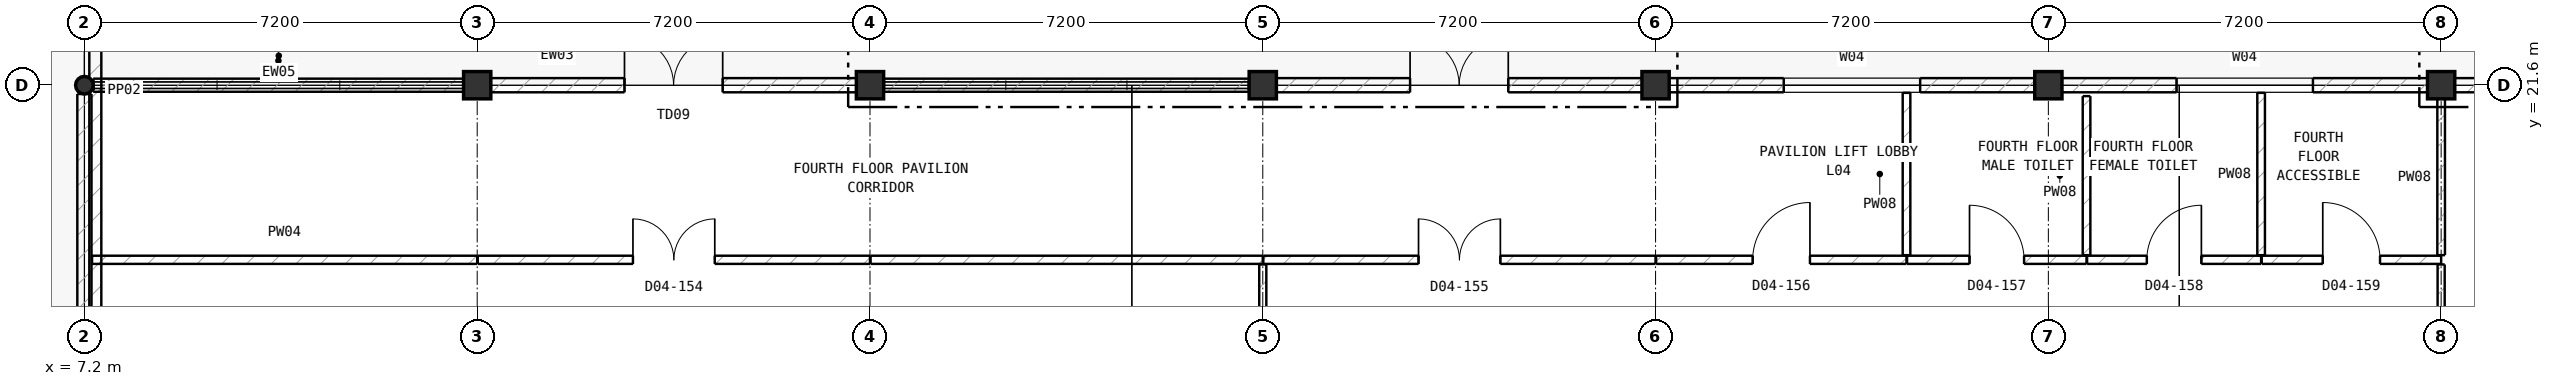
"""IFC4 building model, lengths in metres.
Left out: names, types, materials, properties, quantities, classifications, styles, units other than length and angle.
Written with IfcOpenShell. Run it as: python <this file> out.ifc"""

import sys

from ifc_helpers import new_model, si_unit, direction, frame, frame_2d, origin, origin_2d, place, context, subcontext, project, spatial, rectangle, hollow_circle, extrude, element, fill, save


model = new_model("IFC4")
c1 = context("Model", 3, precision=1e-05, world=origin(), true_north=direction((0.0, 1.0)))
c2 = subcontext(c1, "Body", "Model", "MODEL_VIEW")
j1 = project(units=[si_unit("LENGTHUNIT", "METRE"), si_unit("PLANEANGLEUNIT", "RADIAN")], contexts=[c1])
p1 = place(None, origin())
s1 = spatial("IfcSite", under=j1, at=p1, CompositionType="ELEMENT")
p2 = place(p1, origin())
s2 = spatial("IfcBuilding", under=s1, at=p2, CompositionType="ELEMENT")
p3 = place(p2, frame((0.0, 0.0, 20.4)))
s3 = spatial("IfcBuildingStorey", under=s2, at=p3, CompositionType="ELEMENT", Elevation=20.4)
p4 = place(p3, frame((7.2, 21.6, 0.0), z_axis=(0.0, 0.0, 1.0), x_axis=(1.0, 0.0, 0.0)))
e1 = element("IfcColumn", 1, at=p4, inside=s3, PredefinedType="COLUMN", context=c2, shape_type="SweptSolid", body=[
    extrude(hollow_circle(Radius=0.162, WallThickness=0.012, at=origin_2d()), origin(), (0.0, 0.0, 1.0), 4.17),
])
for number, where, z_axis, x_axis in (
    (2, (14.4, 21.6, 0.0), (0.0, 0.0, 1.0), (1.0, 0.0, 0.0)),
    (3, (21.6, 21.6, 0.0), (0.0, 0.0, 1.0), (1.0, 0.0, 0.0)),
    (4, (28.8, 21.6, 0.0), (0.0, 0.0, 1.0), (1.0, 0.0, 0.0)),
    (5, (36.0, 21.6, 0.0), (0.0, 0.0, 1.0), (1.0, 0.0, 0.0)),
    (6, (43.2, 21.6, 0.0), (0.0, 0.0, 1.0), (1.0, 0.0, 0.0)),
    (7, (50.4, 21.6, 0.0), (0.0, 0.0, 1.0), (1.0, 0.0, 0.0)),
):
    element("IfcColumn", number, at=place(p3, frame(where, z_axis=z_axis, x_axis=x_axis)), inside=s3, PredefinedType="COLUMN", context=c2, shape_type="SweptSolid", body=[
        extrude(rectangle(XDim=0.5, YDim=0.5, at=origin_2d()), origin(), (0.0, 0.0, 1.0), 4.4),
    ])
p5 = place(p3, frame((7.36, 21.6, 0.0), z_axis=(0.0, 0.0, 1.0), x_axis=(1.0, 0.0, 0.0)))
e8 = element("IfcWall", 8, at=p5, inside=s3, PredefinedType="SOLIDWALL", context=c2, shape_type="SweptSolid", body=[
    extrude(rectangle(XDim=6.805, YDim=0.24, at=frame_2d((3.402, 0.0))), origin(), (0.0, 0.0, 1.0), 0.3),
])
p6 = place(p3, frame((14.635, 21.6, 0.0), z_axis=(0.0, 0.0, 1.0), x_axis=(1.0, 0.0, 0.0)))
e9 = element("IfcWall", 9, at=p6, inside=s3, PredefinedType="SOLIDWALL", context=c2, shape_type="SweptSolid", body=[
    extrude(rectangle(XDim=6.73, YDim=0.26, at=frame_2d((3.365, 0.0))), origin(), (0.0, 0.0, 1.0), 3.655),
])
p7 = place(p6, frame((2.465, 0.0, 0.0)))
e10 = element("IfcOpeningElement", 10, at=p7, cuts=e9, PredefinedType="OPENING", context=c2, shape_type="SweptSolid", body=[
    extrude(rectangle(XDim=1.8, YDim=2.3, at=frame_2d((0.9, 1.15))), frame((0.0, 0.14, 0.0), z_axis=(0.0, -1.0, 0.0), x_axis=(1.0, 0.0, 0.0)), (0.0, 0.0, 1.0), 0.28),
])
p8 = place(p3, frame((21.835, 21.6, 0.0), z_axis=(0.0, 0.0, 1.0), x_axis=(1.0, 0.0, 0.0)))
e11 = element("IfcWall", 11, at=p8, inside=s3, PredefinedType="SOLIDWALL", context=c2, shape_type="SweptSolid", body=[
    extrude(rectangle(XDim=6.73, YDim=0.24, at=frame_2d((3.365, 0.0))), origin(), (0.0, 0.0, 1.0), 0.3),
])
p9 = place(p3, frame((29.035, 21.6, 0.0), z_axis=(0.0, 0.0, 1.0), x_axis=(1.0, 0.0, 0.0)))
e12 = element("IfcWall", 12, at=p9, inside=s3, PredefinedType="SOLIDWALL", context=c2, shape_type="SweptSolid", body=[
    extrude(rectangle(XDim=6.73, YDim=0.26, at=frame_2d((3.365, 0.0))), origin(), (0.0, 0.0, 1.0), 3.655),
])
p10 = place(p9, frame((2.465, 0.0, 0.0)))
e13 = element("IfcOpeningElement", 13, at=p10, cuts=e12, PredefinedType="OPENING", context=c2, shape_type="SweptSolid", body=[
    extrude(rectangle(XDim=1.8, YDim=2.3, at=frame_2d((0.9, 1.15))), frame((0.0, 0.14, 0.0), z_axis=(0.0, -1.0, 0.0), x_axis=(1.0, 0.0, 0.0)), (0.0, 0.0, 1.0), 0.28),
])
p11 = place(p3, frame((36.235, 21.6, 0.0), z_axis=(0.0, 0.0, 1.0), x_axis=(1.0, 0.0, 0.0)))
e14 = element("IfcWall", 14, at=p11, inside=s3, PredefinedType="SOLIDWALL", context=c2, shape_type="SweptSolid", body=[
    extrude(rectangle(XDim=6.73, YDim=0.26, at=frame_2d((3.365, 0.0))), origin(), (0.0, 0.0, 1.0), 3.655),
])
p12 = place(p11, frame((2.115, 0.0, 0.85)))
e15 = element("IfcOpeningElement", 15, at=p12, cuts=e14, PredefinedType="OPENING", context=c2, shape_type="SweptSolid", body=[
    extrude(rectangle(XDim=2.5, YDim=2.2, at=frame_2d((1.25, 1.1))), frame((0.0, 0.14, 0.0), z_axis=(0.0, -1.0, 0.0), x_axis=(1.0, 0.0, 0.0)), (0.0, 0.0, 1.0), 0.28),
])
p13 = place(p3, frame((43.435, 21.6, 0.0), z_axis=(0.0, 0.0, 1.0), x_axis=(1.0, 0.0, 0.0)))
e16 = element("IfcWall", 16, at=p13, inside=s3, PredefinedType="SOLIDWALL", context=c2, shape_type="SweptSolid", body=[
    extrude(rectangle(XDim=6.73, YDim=0.26, at=frame_2d((3.365, 0.0))), origin(), (0.0, 0.0, 1.0), 3.655),
])
p14 = place(p13, frame((2.115, 0.0, 0.85)))
e17 = element("IfcOpeningElement", 17, at=p14, cuts=e16, PredefinedType="OPENING", context=c2, shape_type="SweptSolid", body=[
    extrude(rectangle(XDim=2.5, YDim=2.2, at=frame_2d((1.25, 1.1))), frame((0.0, 0.14, 0.0), z_axis=(0.0, -1.0, 0.0), x_axis=(1.0, 0.0, 0.0)), (0.0, 0.0, 1.0), 0.28),
])
p15 = place(p3, frame((50.635, 21.6, 0.0), z_axis=(0.0, 0.0, 1.0), x_axis=(1.0, 0.0, 0.0)))
e18 = element("IfcWall", 18, at=p15, inside=s3, PredefinedType="SOLIDWALL", context=c2, shape_type="SweptSolid", body=[
    extrude(rectangle(XDim=6.73, YDim=0.26, at=frame_2d((3.365, 0.0))), origin(), (0.0, 0.0, 1.0), 3.655),
])
p16 = place(p15, frame((2.465, 0.0, 0.0)))
e19 = element("IfcOpeningElement", 19, at=p16, cuts=e18, PredefinedType="OPENING", context=c2, shape_type="SweptSolid", body=[
    extrude(rectangle(XDim=1.8, YDim=2.3, at=frame_2d((0.9, 1.15))), frame((0.0, 0.14, 0.0), z_axis=(0.0, -1.0, 0.0), x_axis=(1.0, 0.0, 0.0)), (0.0, 0.0, 1.0), 0.28),
])
p17 = place(p3, frame((7.2, 14.561, 0.0), z_axis=(0.0, 0.0, 1.0), x_axis=(0.0, 1.0, 0.0)))
e20 = element("IfcWall", 20, at=p17, inside=s3, PredefinedType="SOLIDWALL", context=c2, shape_type="SweptSolid", body=[
    extrude(rectangle(XDim=6.879, YDim=0.26, at=frame_2d((3.439, 0.0))), origin(), (0.0, 0.0, 1.0), 3.705),
])
p18 = place(p17, frame((1.1, 0.0, 0.0)))
e21 = element("IfcOpeningElement", 21, at=p18, cuts=e20, PredefinedType="OPENING", context=c2, shape_type="SweptSolid", body=[
    extrude(rectangle(XDim=1.6, YDim=2.3, at=frame_2d((0.8, 1.15))), frame((0.0, 0.14, 0.0), z_axis=(0.0, -1.0, 0.0), x_axis=(1.0, 0.0, 0.0)), (0.0, 0.0, 1.0), 0.28),
])
p19 = place(p3, frame((7.4, 28.6, 4.4), z_axis=(0.0, 0.0, 1.0), x_axis=(0.0, -1.0, 0.0)))
e22 = element("IfcWall", 22, at=p19, inside=s3, PredefinedType="PARAPET", context=c2, shape_type="SweptSolid", body=[
    extrude(rectangle(XDim=14.2, YDim=0.22, at=frame_2d((7.1, 0.0))), origin(), (0.0, 0.0, 1.0), 1.15),
])
p20 = place(p3, frame((7.34, 18.4, 0.0), z_axis=(0.0, 0.0, 1.0), x_axis=(1.0, 0.0, 0.0)))
e23 = element("IfcWall", 23, at=p20, inside=s3, PredefinedType="PARTITIONING", context=c2, shape_type="SweptSolid", body=[
    extrude(rectangle(XDim=7.06, YDim=0.15, at=frame_2d((3.53, 0.0))), origin(), (0.0, 0.0, 1.0), 4.12),
])
p21 = place(p3, frame((14.41, 18.4, 0.0), z_axis=(0.0, 0.0, 1.0), x_axis=(1.0, 0.0, 0.0)))
e24 = element("IfcWall", 24, at=p21, inside=s3, PredefinedType="PARTITIONING", context=c2, shape_type="SweptSolid", body=[
    extrude(rectangle(XDim=7.19, YDim=0.15, at=frame_2d((3.595, 0.0))), origin(), (0.0, 0.0, 1.0), 4.12),
])
p22 = place(p21, frame((2.845, 0.0, 0.0)))
e25 = element("IfcOpeningElement", 25, at=p22, cuts=e24, PredefinedType="OPENING", context=c2, shape_type="SweptSolid", body=[
    extrude(rectangle(XDim=1.5, YDim=2.2, at=frame_2d((0.75, 1.1))), frame((0.0, 0.085, 0.0), z_axis=(0.0, -1.0, 0.0), x_axis=(1.0, 0.0, 0.0)), (0.0, 0.0, 1.0), 0.17),
])
p23 = place(p3, frame((21.61, 18.4, 0.0), z_axis=(0.0, 0.0, 1.0), x_axis=(1.0, 0.0, 0.0)))
e26 = element("IfcWall", 26, at=p23, inside=s3, PredefinedType="PARTITIONING", context=c2, shape_type="SweptSolid", body=[
    extrude(rectangle(XDim=7.19, YDim=0.15, at=frame_2d((3.595, 0.0))), origin(), (0.0, 0.0, 1.0), 4.12),
])
p24 = place(p3, frame((28.81, 18.4, 0.0), z_axis=(0.0, 0.0, 1.0), x_axis=(1.0, 0.0, 0.0)))
e27 = element("IfcWall", 27, at=p24, inside=s3, PredefinedType="PARTITIONING", context=c2, shape_type="SweptSolid", body=[
    extrude(rectangle(XDim=7.19, YDim=0.15, at=frame_2d((3.595, 0.0))), origin(), (0.0, 0.0, 1.0), 4.12),
])
p25 = place(p24, frame((2.845, 0.0, 0.0)))
e28 = element("IfcOpeningElement", 28, at=p25, cuts=e27, PredefinedType="OPENING", context=c2, shape_type="SweptSolid", body=[
    extrude(rectangle(XDim=1.5, YDim=2.2, at=frame_2d((0.75, 1.1))), frame((0.0, 0.085, 0.0), z_axis=(0.0, -1.0, 0.0), x_axis=(1.0, 0.0, 0.0)), (0.0, 0.0, 1.0), 0.17),
])
p26 = place(p3, frame((36.01, 18.4, 0.0), z_axis=(0.0, 0.0, 1.0), x_axis=(1.0, 0.0, 0.0)))
e29 = element("IfcWall", 29, at=p26, inside=s3, PredefinedType="PARTITIONING", context=c2, shape_type="SweptSolid", body=[
    extrude(rectangle(XDim=4.59, YDim=0.15, at=frame_2d((2.295, 0.0))), origin(), (0.0, 0.0, 1.0), 4.12),
])
p27 = place(p26, frame((1.77, 0.0, 0.0)))
e30 = element("IfcOpeningElement", 30, at=p27, cuts=e29, PredefinedType="OPENING", context=c2, shape_type="SweptSolid", body=[
    extrude(rectangle(XDim=1.05, YDim=2.15, at=frame_2d((0.525, 1.075))), frame((0.0, 0.085, 0.0), z_axis=(0.0, -1.0, 0.0), x_axis=(1.0, 0.0, 0.0)), (0.0, 0.0, 1.0), 0.17),
])
p28 = place(p3, frame((40.61, 18.4, 0.0), z_axis=(0.0, 0.0, 1.0), x_axis=(1.0, 0.0, 0.0)))
e31 = element("IfcWall", 31, at=p28, inside=s3, PredefinedType="PARTITIONING", context=c2, shape_type="SweptSolid", body=[
    extrude(rectangle(XDim=3.29, YDim=0.15, at=frame_2d((1.645, 0.0))), origin(), (0.0, 0.0, 1.0), 4.12),
])
p29 = place(p28, frame((1.145, 0.0, 0.0)))
e32 = element("IfcOpeningElement", 32, at=p29, cuts=e31, PredefinedType="OPENING", context=c2, shape_type="SweptSolid", body=[
    extrude(rectangle(XDim=1.0, YDim=2.15, at=frame_2d((0.5, 1.075))), frame((0.0, 0.085, 0.0), z_axis=(0.0, -1.0, 0.0), x_axis=(1.0, 0.0, 0.0)), (0.0, 0.0, 1.0), 0.17),
])
p30 = place(p3, frame((43.91, 18.4, 0.0), z_axis=(0.0, 0.0, 1.0), x_axis=(1.0, 0.0, 0.0)))
e33 = element("IfcWall", 33, at=p30, inside=s3, PredefinedType="PARTITIONING", context=c2, shape_type="SweptSolid", body=[
    extrude(rectangle(XDim=3.19, YDim=0.15, at=frame_2d((1.595, 0.0))), origin(), (0.0, 0.0, 1.0), 4.12),
])
p31 = place(p30, frame((1.095, 0.0, 0.0)))
e34 = element("IfcOpeningElement", 34, at=p31, cuts=e33, PredefinedType="OPENING", context=c2, shape_type="SweptSolid", body=[
    extrude(rectangle(XDim=1.0, YDim=2.15, at=frame_2d((0.5, 1.075))), frame((0.0, 0.085, 0.0), z_axis=(0.0, -1.0, 0.0), x_axis=(1.0, 0.0, 0.0)), (0.0, 0.0, 1.0), 0.17),
])
p32 = place(p3, frame((47.11, 18.4, 0.0), z_axis=(0.0, 0.0, 1.0), x_axis=(1.0, 0.0, 0.0)))
e35 = element("IfcWall", 35, at=p32, inside=s3, PredefinedType="PARTITIONING", context=c2, shape_type="SweptSolid", body=[
    extrude(rectangle(XDim=3.29, YDim=0.15, at=frame_2d((1.645, 0.0))), origin(), (0.0, 0.0, 1.0), 4.12),
])
p33 = place(p32, frame((1.12, 0.0, 0.0)))
e36 = element("IfcOpeningElement", 36, at=p33, cuts=e35, PredefinedType="OPENING", context=c2, shape_type="SweptSolid", body=[
    extrude(rectangle(XDim=1.05, YDim=2.15, at=frame_2d((0.525, 1.075))), frame((0.0, 0.085, 0.0), z_axis=(0.0, -1.0, 0.0), x_axis=(1.0, 0.0, 0.0)), (0.0, 0.0, 1.0), 0.17),
])
p34 = place(p3, frame((40.6, 18.485, 0.0), z_axis=(0.0, 0.0, 1.0), x_axis=(0.0, 1.0, 0.0)))
e37 = element("IfcWall", 37, at=p34, inside=s3, PredefinedType="PARTITIONING", context=c2, shape_type="SweptSolid", body=[
    extrude(rectangle(XDim=2.975, YDim=0.14, at=frame_2d((1.487, 0.0))), origin(), (0.0, 0.0, 1.0), 4.12),
])
p35 = place(p3, frame((43.9, 18.485, 0.0), z_axis=(0.0, 0.0, 1.0), x_axis=(0.0, 1.0, 0.0)))
e38 = element("IfcWall", 38, at=p35, inside=s3, PredefinedType="PARTITIONING", context=c2, shape_type="SweptSolid", body=[
    extrude(rectangle(XDim=2.915, YDim=0.14, at=frame_2d((1.458, 0.0))), origin(), (0.0, 0.0, 1.0), 4.12),
])
p36 = place(p3, frame((47.1, 18.485, 0.0), z_axis=(0.0, 0.0, 1.0), x_axis=(0.0, 1.0, 0.0)))
e39 = element("IfcWall", 39, at=p36, inside=s3, PredefinedType="PARTITIONING", context=c2, shape_type="SweptSolid", body=[
    extrude(rectangle(XDim=2.975, YDim=0.14, at=frame_2d((1.487, 0.0))), origin(), (0.0, 0.0, 1.0), 4.12),
])
p37 = place(p3, frame((50.4, 18.485, 0.0), z_axis=(0.0, 0.0, 1.0), x_axis=(0.0, 1.0, 0.0)))
e40 = element("IfcWall", 40, at=p37, inside=s3, PredefinedType="PARTITIONING", context=c2, shape_type="SweptSolid", body=[
    extrude(rectangle(XDim=2.865, YDim=0.14, at=frame_2d((1.433, 0.0))), origin(), (0.0, 0.0, 1.0), 3.65),
])
p38 = place(p3, frame((28.8, 14.65, 0.0), z_axis=(0.0, 0.0, 1.0), x_axis=(0.0, 1.0, 0.0)))
e41 = element("IfcWall", 41, at=p38, inside=s3, PredefinedType="PARTITIONING", context=c2, shape_type="SweptSolid", body=[
    extrude(rectangle(XDim=3.665, YDim=0.13, at=frame_2d((1.833, 0.0))), origin(), (0.0, 0.0, 1.0), 3.65),
])
p39 = place(p3, frame((50.4, 14.65, 0.0), z_axis=(0.0, 0.0, 1.0), x_axis=(0.0, 1.0, 0.0)))
e42 = element("IfcWall", 42, at=p39, inside=s3, PredefinedType="PARTITIONING", context=c2, shape_type="SweptSolid", body=[
    extrude(rectangle(XDim=3.665, YDim=0.13, at=frame_2d((1.833, 0.0))), origin(), (0.0, 0.0, 1.0), 3.65),
])
p40 = place(p39, frame((1.333, 0.0, 0.0)))
e43 = element("IfcOpeningElement", 43, at=p40, cuts=e42, PredefinedType="OPENING", context=c2, shape_type="SweptSolid", body=[
    extrude(rectangle(XDim=1.0, YDim=2.1, at=frame_2d((0.5, 1.05))), frame((0.0, 0.075, 0.0), z_axis=(0.0, -1.0, 0.0), x_axis=(1.0, 0.0, 0.0)), (0.0, 0.0, 1.0), 0.15),
])
p41 = place(p7, origin())
e44 = element("IfcDoor", 44, at=p41, inside=s3, OperationType="DOUBLE_DOOR_SINGLE_SWING", PredefinedType="DOOR", context=c2, shape_type="SweptSolid", body=[
    extrude(rectangle(XDim=1.8, YDim=2.3, at=frame_2d((0.9, 1.15))), frame((0.0, 0.025, 0.0), z_axis=(0.0, -1.0, 0.0), x_axis=(1.0, 0.0, 0.0)), (0.0, 0.0, 1.0), 0.05),
])
fill(e10, e44)
p42 = place(p10, origin())
e45 = element("IfcDoor", 45, at=p42, inside=s3, OperationType="DOUBLE_DOOR_SINGLE_SWING", PredefinedType="DOOR", context=c2, shape_type="SweptSolid", body=[
    extrude(rectangle(XDim=1.8, YDim=2.3, at=frame_2d((0.9, 1.15))), frame((0.0, 0.025, 0.0), z_axis=(0.0, -1.0, 0.0), x_axis=(1.0, 0.0, 0.0)), (0.0, 0.0, 1.0), 0.05),
])
fill(e13, e45)
p43 = place(p12, origin())
e46 = element("IfcWindow", 46, at=p43, inside=s3, PartitioningType="SINGLE_PANEL", PredefinedType="WINDOW", context=c2, shape_type="SweptSolid", body=[
    extrude(rectangle(XDim=2.5, YDim=2.2, at=frame_2d((1.25, 1.1))), frame((0.0, 0.03, 0.0), z_axis=(0.0, -1.0, 0.0), x_axis=(1.0, 0.0, 0.0)), (0.0, 0.0, 1.0), 0.06),
])
fill(e15, e46)
p44 = place(p14, origin())
e47 = element("IfcWindow", 47, at=p44, inside=s3, PartitioningType="SINGLE_PANEL", PredefinedType="WINDOW", context=c2, shape_type="SweptSolid", body=[
    extrude(rectangle(XDim=2.5, YDim=2.2, at=frame_2d((1.25, 1.1))), frame((0.0, 0.03, 0.0), z_axis=(0.0, -1.0, 0.0), x_axis=(1.0, 0.0, 0.0)), (0.0, 0.0, 1.0), 0.06),
])
fill(e17, e47)
p45 = place(p22, origin())
e48 = element("IfcDoor", 48, at=p45, inside=s3, OperationType="DOUBLE_DOOR_SINGLE_SWING", PredefinedType="DOOR", context=c2, shape_type="SweptSolid", body=[
    extrude(rectangle(XDim=1.5, YDim=2.2, at=frame_2d((0.75, 1.1))), frame((0.0, 0.025, 0.0), z_axis=(0.0, -1.0, 0.0), x_axis=(1.0, 0.0, 0.0)), (0.0, 0.0, 1.0), 0.05),
])
fill(e25, e48)
p46 = place(p25, origin())
e49 = element("IfcDoor", 49, at=p46, inside=s3, OperationType="DOUBLE_DOOR_SINGLE_SWING", PredefinedType="DOOR", context=c2, shape_type="SweptSolid", body=[
    extrude(rectangle(XDim=1.5, YDim=2.2, at=frame_2d((0.75, 1.1))), frame((0.0, 0.025, 0.0), z_axis=(0.0, -1.0, 0.0), x_axis=(1.0, 0.0, 0.0)), (0.0, 0.0, 1.0), 0.05),
])
fill(e28, e49)
p47 = place(p27, origin())
e50 = element("IfcDoor", 50, at=p47, inside=s3, OperationType="SINGLE_SWING_RIGHT", PredefinedType="DOOR", context=c2, shape_type="SweptSolid", body=[
    extrude(rectangle(XDim=1.05, YDim=2.15, at=frame_2d((0.525, 1.075))), frame((0.0, 0.025, 0.0), z_axis=(0.0, -1.0, 0.0), x_axis=(1.0, 0.0, 0.0)), (0.0, 0.0, 1.0), 0.05),
])
fill(e30, e50)
p48 = place(p29, origin())
e51 = element("IfcDoor", 51, at=p48, inside=s3, OperationType="SINGLE_SWING_LEFT", PredefinedType="DOOR", context=c2, shape_type="SweptSolid", body=[
    extrude(rectangle(XDim=1.0, YDim=2.15, at=frame_2d((0.5, 1.075))), frame((0.0, 0.025, 0.0), z_axis=(0.0, -1.0, 0.0), x_axis=(1.0, 0.0, 0.0)), (0.0, 0.0, 1.0), 0.05),
])
fill(e32, e51)
p49 = place(p31, origin())
e52 = element("IfcDoor", 52, at=p49, inside=s3, OperationType="SINGLE_SWING_RIGHT", PredefinedType="DOOR", context=c2, shape_type="SweptSolid", body=[
    extrude(rectangle(XDim=1.0, YDim=2.15, at=frame_2d((0.5, 1.075))), frame((0.0, 0.025, 0.0), z_axis=(0.0, -1.0, 0.0), x_axis=(1.0, 0.0, 0.0)), (0.0, 0.0, 1.0), 0.05),
])
fill(e34, e52)
p50 = place(p33, origin())
e53 = element("IfcDoor", 53, at=p50, inside=s3, OperationType="SINGLE_SWING_LEFT", PredefinedType="DOOR", context=c2, shape_type="SweptSolid", body=[
    extrude(rectangle(XDim=1.05, YDim=2.15, at=frame_2d((0.525, 1.075))), frame((0.0, 0.025, 0.0), z_axis=(0.0, -1.0, 0.0), x_axis=(1.0, 0.0, 0.0)), (0.0, 0.0, 1.0), 0.05),
])
fill(e36, e53)
save(model, sys.argv[1])
